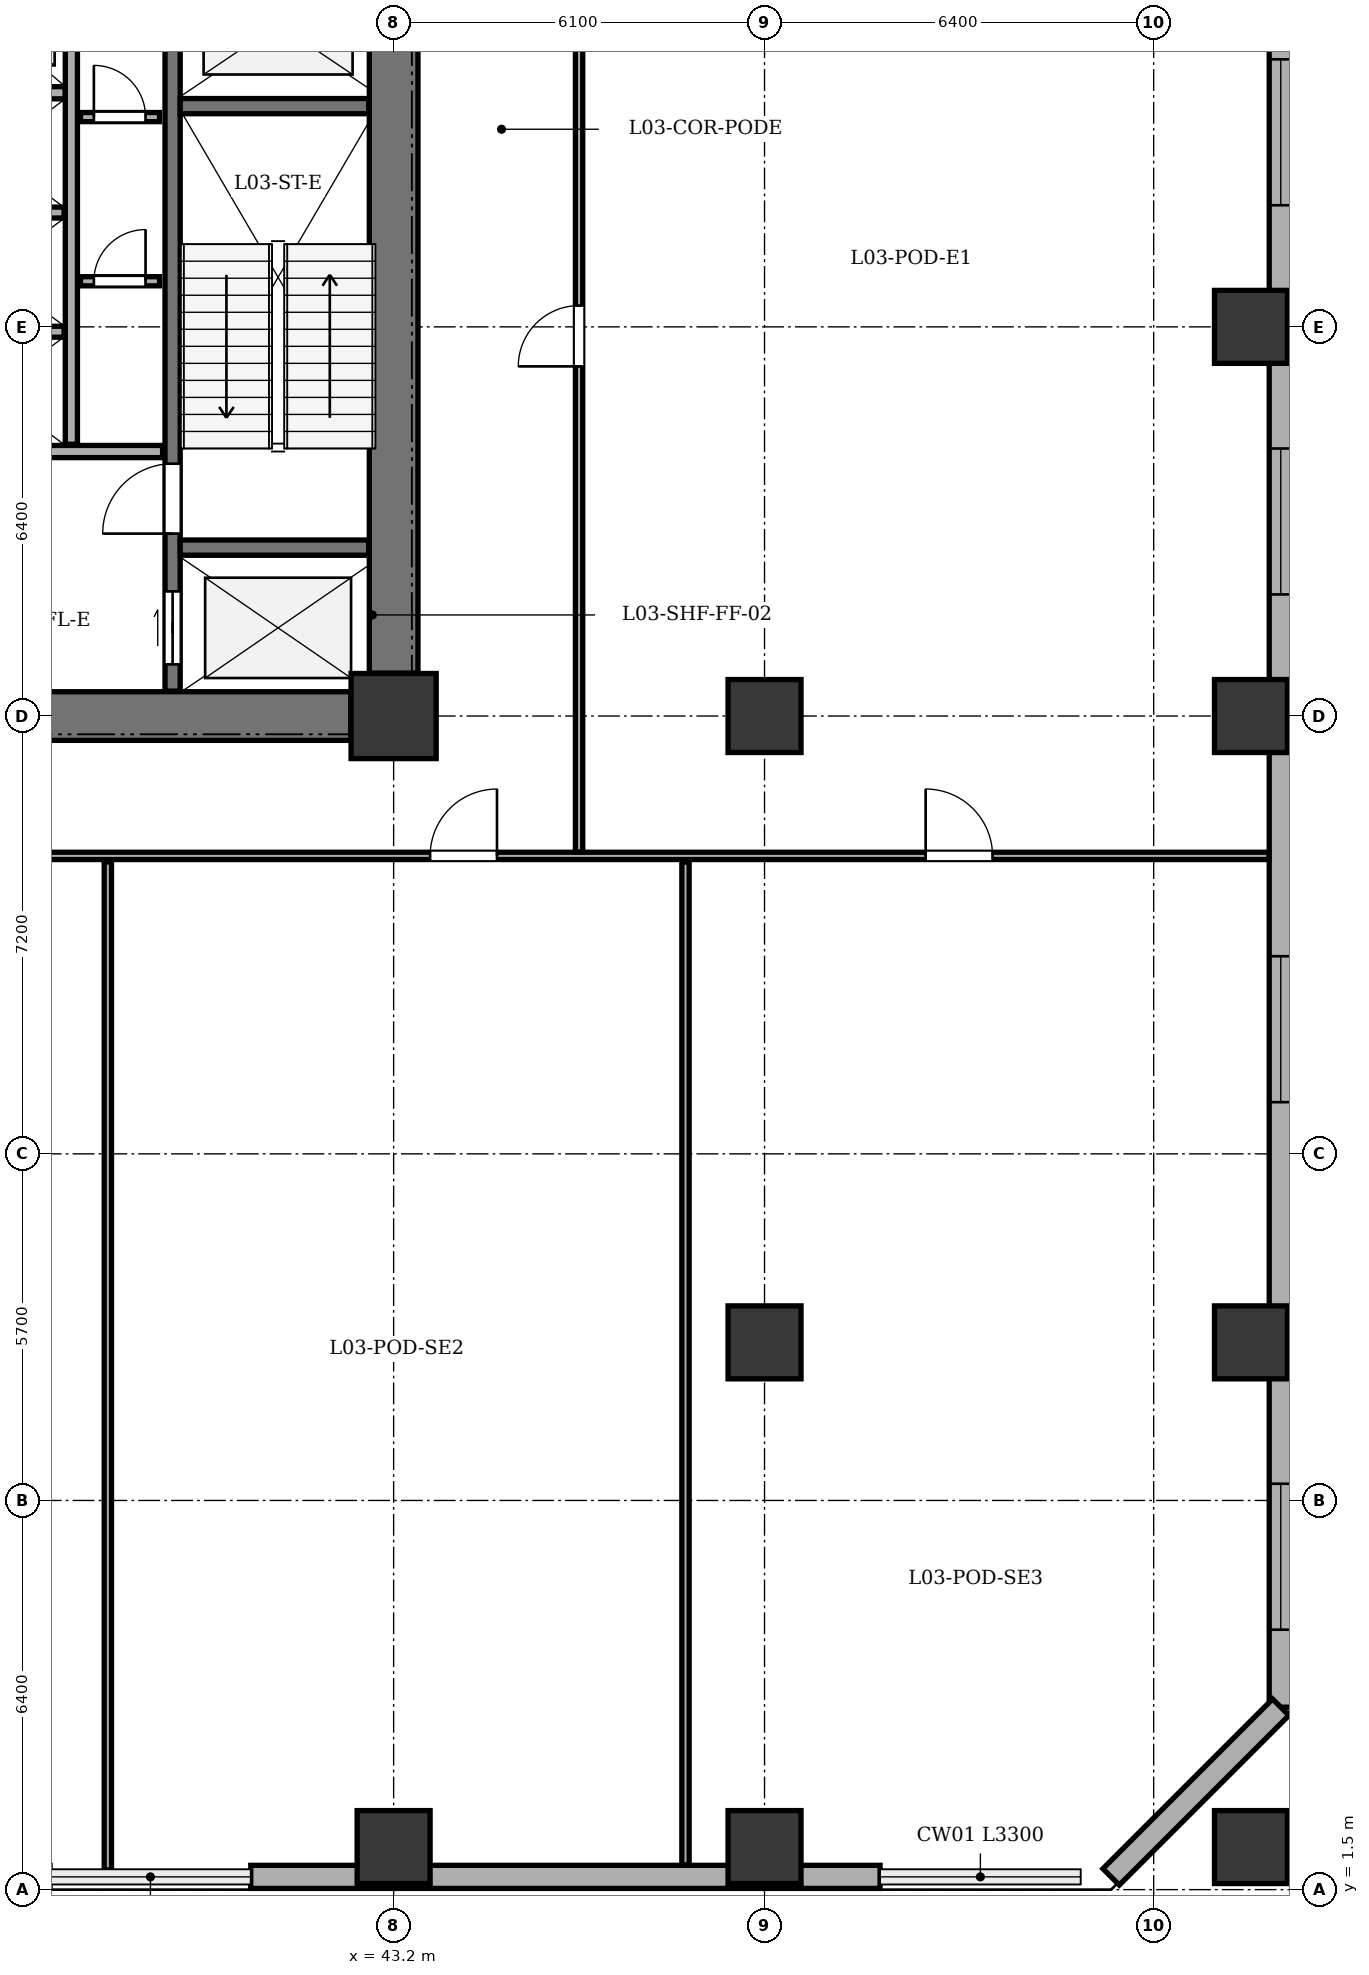
"""IFC4 building model, lengths in metres.
Left out: names, types, materials, properties, quantities, classifications, styles, units other than length and angle.
Written with IfcOpenShell. Run it as: python <this file> out.ifc"""

import sys

from ifc_helpers import new_model, si_unit, direction, frame, frame_2d, origin, origin_2d, place, context, subcontext, project, spatial, rectangle, extrude, element, fill, save


model = new_model("IFC4")
c1 = context("Model", 3, precision=1e-05, world=origin(), true_north=direction((0.0, 1.0)))
c2 = subcontext(c1, "Body", "Model", "MODEL_VIEW")
j1 = project(units=[si_unit("LENGTHUNIT", "METRE"), si_unit("PLANEANGLEUNIT", "RADIAN")], contexts=[c1])
p1 = place(None, origin())
s1 = spatial("IfcSite", under=j1, at=p1, CompositionType="ELEMENT")
p2 = place(p1, origin())
s2 = spatial("IfcBuilding", under=s1, at=p2, CompositionType="ELEMENT")
p3 = place(p2, frame((0.0, 0.0, 14.4)))
s3 = spatial("IfcBuildingStorey", under=s2, at=p3, CompositionType="ELEMENT", Elevation=14.4)
p4 = place(p3, frame((43.2, 20.8, 0.0), z_axis=(0.0, 0.0, 1.0), x_axis=(1.0, 0.0, 0.0)))
e1 = element("IfcColumn", 1, at=p4, inside=s3, PredefinedType="COLUMN", context=c2, shape_type="SweptSolid", body=[
    extrude(rectangle(XDim=1.4, YDim=1.4, at=origin_2d()), origin(), (0.0, 0.0, 1.0), 4.5),
])
for number, where, z_axis, x_axis in (
    (2, (43.2, 2.2, 0.0), (0.0, 0.0, 1.0), (1.0, 0.0, 0.0)),
    (3, (49.3, 2.2, 0.0), (0.0, 0.0, 1.0), (1.0, 0.0, 0.0)),
    (4, (57.3, 2.2, 0.0), (0.0, 0.0, 1.0), (1.0, 0.0, 0.0)),
    (5, (57.3, 10.5, 0.0), (0.0, 0.0, 1.0), (1.0, 0.0, 0.0)),
    (6, (57.3, 20.8, 0.0), (0.0, 0.0, 1.0), (1.0, 0.0, 0.0)),
    (7, (57.3, 27.2, 0.0), (0.0, 0.0, 1.0), (1.0, 0.0, 0.0)),
    (8, (49.3, 10.5, 0.0), (0.0, 0.0, 1.0), (1.0, 0.0, 0.0)),
    (9, (49.3, 20.8, 0.0), (0.0, 0.0, 1.0), (1.0, 0.0, 0.0)),
):
    element("IfcColumn", number, at=place(p3, frame(where, z_axis=z_axis, x_axis=x_axis)), inside=s3, PredefinedType="COLUMN", context=c2, shape_type="SweptSolid", body=[
        extrude(rectangle(XDim=1.2, YDim=1.2, at=origin_2d()), origin(), (0.0, 0.0, 1.0), 4.5),
    ])
p5 = place(p3, frame((51.2, 1.71, 0.0), z_axis=(0.0, 0.0, 1.0), x_axis=(-1.0, 0.0, 0.0)))
e10 = element("IfcWall", 10, at=p5, inside=s3, PredefinedType="STANDARD", context=c2, shape_type="SweptSolid", body=[
    extrude(rectangle(XDim=10.35, YDim=0.38, at=frame_2d((5.175, 0.0))), origin(), (0.0, 0.0, 1.0), 4.0),
])
p6 = place(p3, frame((57.79, 49.9, 0.0), z_axis=(0.0, 0.0, 1.0), x_axis=(0.0, -1.0, 0.0)))
e11 = element("IfcWall", 11, at=p6, inside=s3, PredefinedType="STANDARD", context=c2, shape_type="SweptSolid", body=[
    extrude(rectangle(XDim=45.4, YDim=0.38, at=frame_2d((22.7, 0.0))), origin(), (0.0, 0.0, 1.0), 4.0),
])
p7 = place(p6, frame((1.275, 0.0, 0.75)))
e12 = element("IfcOpeningElement", 12, at=p7, cuts=e11, PredefinedType="OPENING", context=c2, shape_type="SweptSolid", body=[
    extrude(rectangle(XDim=2.4, YDim=2.1, at=frame_2d((1.2, 1.05))), frame((0.0, 0.2, 0.0), z_axis=(0.0, -1.0, 0.0), x_axis=(1.0, 0.0, 0.0)), (0.0, 0.0, 1.0), 0.4),
])
p8 = place(p6, frame((9.95, 0.0, 0.75)))
e13 = element("IfcOpeningElement", 13, at=p8, cuts=e11, PredefinedType="OPENING", context=c2, shape_type="SweptSolid", body=[
    extrude(rectangle(XDim=2.4, YDim=2.1, at=frame_2d((1.2, 1.05))), frame((0.0, 0.2, 0.0), z_axis=(0.0, -1.0, 0.0), x_axis=(1.0, 0.0, 0.0)), (0.0, 0.0, 1.0), 0.4),
])
p9 = place(p6, frame((18.3, 0.0, 0.75)))
e14 = element("IfcOpeningElement", 14, at=p9, cuts=e11, PredefinedType="OPENING", context=c2, shape_type="SweptSolid", body=[
    extrude(rectangle(XDim=2.4, YDim=2.1, at=frame_2d((1.2, 1.05))), frame((0.0, 0.2, 0.0), z_axis=(0.0, -1.0, 0.0), x_axis=(1.0, 0.0, 0.0)), (0.0, 0.0, 1.0), 0.4),
])
p10 = place(p6, frame((24.7, 0.0, 0.75)))
e15 = element("IfcOpeningElement", 15, at=p10, cuts=e11, PredefinedType="OPENING", context=c2, shape_type="SweptSolid", body=[
    extrude(rectangle(XDim=2.4, YDim=2.1, at=frame_2d((1.2, 1.05))), frame((0.0, 0.2, 0.0), z_axis=(0.0, -1.0, 0.0), x_axis=(1.0, 0.0, 0.0)), (0.0, 0.0, 1.0), 0.4),
])
p11 = place(p6, frame((33.05, 0.0, 0.75)))
e16 = element("IfcOpeningElement", 16, at=p11, cuts=e11, PredefinedType="OPENING", context=c2, shape_type="SweptSolid", body=[
    extrude(rectangle(XDim=2.4, YDim=2.1, at=frame_2d((1.2, 1.05))), frame((0.0, 0.2, 0.0), z_axis=(0.0, -1.0, 0.0), x_axis=(1.0, 0.0, 0.0)), (0.0, 0.0, 1.0), 0.4),
])
p12 = place(p6, frame((41.725, 0.0, 0.75)))
e17 = element("IfcOpeningElement", 17, at=p12, cuts=e11, PredefinedType="OPENING", context=c2, shape_type="SweptSolid", body=[
    extrude(rectangle(XDim=2.4, YDim=2.1, at=frame_2d((1.2, 1.05))), frame((0.0, 0.2, 0.0), z_axis=(0.0, -1.0, 0.0), x_axis=(1.0, 0.0, 0.0)), (0.0, 0.0, 1.0), 0.4),
])
p13 = place(p3, frame((57.79, 4.5, 0.0), z_axis=(0.0, 0.0, 1.0), x_axis=(-0.707106781187, -0.707106781187, 0.0)))
e18 = element("IfcWall", 18, at=p13, inside=s3, PredefinedType="STANDARD", context=c2, shape_type="SweptSolid", body=[
    extrude(rectangle(XDim=3.946, YDim=0.38, at=frame_2d((1.973, 0.0))), origin(), (0.0, 0.0, 1.0), 4.0),
])
p14 = place(p3, frame((43.2, 21.505, 0.0), z_axis=(0.0, 0.0, 1.0), x_axis=(0.0, 1.0, 0.0)))
e19 = element("IfcWall", 19, at=p14, inside=s3, PredefinedType="SHEAR", context=c2, shape_type="SweptSolid", body=[
    extrude(rectangle(XDim=11.39, YDim=0.8, at=frame_2d((5.695, 0.0))), origin(), (0.0, 0.0, 1.0), 4.0),
])
p15 = place(p3, frame((35.905, 20.8, 0.0), z_axis=(0.0, 0.0, 1.0), x_axis=(1.0, 0.0, 0.0)))
e20 = element("IfcWall", 20, at=p15, inside=s3, PredefinedType="SHEAR", context=c2, shape_type="SweptSolid", body=[
    extrude(rectangle(XDim=6.59, YDim=0.8, at=frame_2d((3.295, 0.0))), origin(), (0.0, 0.0, 1.0), 4.0),
])
p16 = place(p3, frame((39.565, 21.21, 0.0), z_axis=(0.0, 0.0, 1.0), x_axis=(0.0, 1.0, 0.0)))
e21 = element("IfcWall", 21, at=p16, inside=s3, PredefinedType="SHEAR", context=c2, shape_type="SweptSolid", body=[
    extrude(rectangle(XDim=11.98, YDim=0.25, at=frame_2d((5.99, 0.0))), origin(), (0.0, 0.0, 1.0), 4.0),
])
p17 = place(p16, frame((0.44, 0.0, 0.0)))
e22 = element("IfcOpeningElement", 22, at=p17, cuts=e21, PredefinedType="OPENING", context=c2, shape_type="SweptSolid", body=[
    extrude(rectangle(XDim=1.2, YDim=2.15, at=frame_2d((0.6, 1.075))), frame((0.0, 0.135, 0.0), z_axis=(0.0, -1.0, 0.0), x_axis=(1.0, 0.0, 0.0)), (0.0, 0.0, 1.0), 0.27),
])
p18 = place(p16, frame((2.59, 0.0, 0.0)))
e23 = element("IfcOpeningElement", 23, at=p18, cuts=e21, PredefinedType="OPENING", context=c2, shape_type="SweptSolid", body=[
    extrude(rectangle(XDim=1.15, YDim=2.15, at=frame_2d((0.575, 1.075))), frame((0.0, 0.135, 0.0), z_axis=(0.0, -1.0, 0.0), x_axis=(1.0, 0.0, 0.0)), (0.0, 0.0, 1.0), 0.27),
])
for number, where, z_axis, x_axis in (
    (24, (39.69, 23.57, 0.0), (0.0, 0.0, 1.0), (1.0, 0.0, 0.0)),
    (25, (39.69, 30.83, 0.0), (0.0, 0.0, 1.0), (1.0, 0.0, 0.0)),
):
    element("IfcWall", number, at=place(p3, frame(where, z_axis=z_axis, x_axis=x_axis)), inside=s3, PredefinedType="SHEAR", context=c2, shape_type="SweptSolid", body=[
        extrude(rectangle(XDim=3.1, YDim=0.25, at=frame_2d((1.55, 0.0))), origin(), (0.0, 0.0, 1.0), 4.0),
    ])
p19 = place(p3, frame((35.61, 25.15, 0.0), z_axis=(0.0, 0.0, 1.0), x_axis=(1.0, 0.0, 0.0)))
e26 = element("IfcWall", 26, at=p19, inside=s3, PredefinedType="SOLIDWALL", context=c2, shape_type="SweptSolid", body=[
    extrude(rectangle(XDim=3.79, YDim=0.2, at=frame_2d((1.895, 0.0))), origin(), (0.0, 0.0, 1.0), 4.0),
])
p20 = place(p3, frame((35.55, 31.05, 0.0), z_axis=(0.0, 0.0, 1.0), x_axis=(1.0, 0.0, 0.0)))
e27 = element("IfcWall", 27, at=p20, inside=s3, PredefinedType="SOLIDWALL", context=c2, shape_type="SweptSolid", body=[
    extrude(rectangle(XDim=2.25, YDim=0.2, at=frame_2d((1.125, 0.0))), origin(), (0.0, 0.0, 1.0), 4.0),
])
p21 = place(p3, frame((37.9, 25.27, 0.0), z_axis=(0.0, 0.0, 1.0), x_axis=(0.0, 1.0, 0.0)))
e28 = element("IfcWall", 28, at=p21, inside=s3, PredefinedType="SOLIDWALL", context=c2, shape_type="SweptSolid", body=[
    extrude(rectangle(XDim=7.92, YDim=0.2, at=frame_2d((3.96, 0.0))), origin(), (0.0, 0.0, 1.0), 4.0),
])
for number, where, z_axis, x_axis in (
    (29, (35.61, 27.12, 0.0), (0.0, 0.0, 1.0), (1.0, 0.0, 0.0)),
    (30, (35.61, 29.08, 0.0), (0.0, 0.0, 1.0), (1.0, 0.0, 0.0)),
):
    element("IfcWall", number, at=place(p3, frame(where, z_axis=z_axis, x_axis=x_axis)), inside=s3, PredefinedType="PARTITIONING", context=c2, shape_type="SweptSolid", body=[
        extrude(rectangle(XDim=2.17, YDim=0.18, at=frame_2d((1.085, 0.0))), origin(), (0.0, 0.0, 1.0), 4.0),
    ])
p22 = place(p3, frame((38.05, 27.95, 0.0), z_axis=(0.0, 0.0, 1.0), x_axis=(1.0, 0.0, 0.0)))
e31 = element("IfcWall", 31, at=p22, inside=s3, PredefinedType="PARTITIONING", context=c2, shape_type="SweptSolid", body=[
    extrude(rectangle(XDim=1.3, YDim=0.15, at=frame_2d((0.65, 0.0))), origin(), (0.0, 0.0, 1.0), 4.0),
])
p23 = place(p22, frame((0.22, 0.0, 0.0)))
e32 = element("IfcOpeningElement", 32, at=p23, cuts=e31, PredefinedType="OPENING", context=c2, shape_type="SweptSolid", body=[
    extrude(rectangle(XDim=0.85, YDim=2.02, at=frame_2d((0.425, 1.01))), frame((0.0, 0.085, 0.0), z_axis=(0.0, -1.0, 0.0), x_axis=(1.0, 0.0, 0.0)), (0.0, 0.0, 1.0), 0.17),
])
p24 = place(p3, frame((38.05, 30.65, 0.0), z_axis=(0.0, 0.0, 1.0), x_axis=(1.0, 0.0, 0.0)))
e33 = element("IfcWall", 33, at=p24, inside=s3, PredefinedType="PARTITIONING", context=c2, shape_type="SweptSolid", body=[
    extrude(rectangle(XDim=1.3, YDim=0.15, at=frame_2d((0.65, 0.0))), origin(), (0.0, 0.0, 1.0), 4.0),
])
p25 = place(p24, frame((0.22, 0.0, 0.0)))
e34 = element("IfcOpeningElement", 34, at=p25, cuts=e33, PredefinedType="OPENING", context=c2, shape_type="SweptSolid", body=[
    extrude(rectangle(XDim=0.85, YDim=2.02, at=frame_2d((0.425, 1.01))), frame((0.0, 0.085, 0.0), z_axis=(0.0, -1.0, 0.0), x_axis=(1.0, 0.0, 0.0)), (0.0, 0.0, 1.0), 0.17),
])
p26 = place(p3, frame((26.015, 18.5, 0.0), z_axis=(0.0, 0.0, 1.0), x_axis=(1.0, 0.0, 0.0)))
e35 = element("IfcWall", 35, at=p26, inside=s3, PredefinedType="PARTITIONING", context=c2, shape_type="SweptSolid", body=[
    extrude(rectangle(XDim=31.58, YDim=0.12, at=frame_2d((15.79, 0.0))), origin(), (0.0, 0.0, 1.0), 3.435),
])
p27 = place(p26, frame((5.61, 0.0, 0.0)))
e36 = element("IfcOpeningElement", 36, at=p27, cuts=e35, PredefinedType="OPENING", context=c2, shape_type="SweptSolid", body=[
    extrude(rectangle(XDim=1.1, YDim=2.15, at=frame_2d((0.55, 1.075))), frame((0.0, 0.07, 0.0), z_axis=(0.0, -1.0, 0.0), x_axis=(1.0, 0.0, 0.0)), (0.0, 0.0, 1.0), 0.14),
])
p28 = place(p26, frame((17.785, 0.0, 0.0)))
e37 = element("IfcOpeningElement", 37, at=p28, cuts=e35, PredefinedType="OPENING", context=c2, shape_type="SweptSolid", body=[
    extrude(rectangle(XDim=1.1, YDim=2.15, at=frame_2d((0.55, 1.075))), frame((0.0, 0.07, 0.0), z_axis=(0.0, -1.0, 0.0), x_axis=(1.0, 0.0, 0.0)), (0.0, 0.0, 1.0), 0.14),
])
p29 = place(p26, frame((25.935, 0.0, 0.0)))
e38 = element("IfcOpeningElement", 38, at=p29, cuts=e35, PredefinedType="OPENING", context=c2, shape_type="SweptSolid", body=[
    extrude(rectangle(XDim=1.1, YDim=2.15, at=frame_2d((0.55, 1.075))), frame((0.0, 0.07, 0.0), z_axis=(0.0, -1.0, 0.0), x_axis=(1.0, 0.0, 0.0)), (0.0, 0.0, 1.0), 0.14),
])
p30 = place(p3, frame((38.5, 1.825, 0.0), z_axis=(0.0, 0.0, 1.0), x_axis=(0.0, 1.0, 0.0)))
e39 = element("IfcWall", 39, at=p30, inside=s3, PredefinedType="PARTITIONING", context=c2, shape_type="SweptSolid", body=[
    extrude(rectangle(XDim=16.575, YDim=0.12, at=frame_2d((8.288, 0.0))), origin(), (0.0, 0.0, 1.0), 4.0),
])
p31 = place(p3, frame((48.0, 1.905, 0.0), z_axis=(0.0, 0.0, 1.0), x_axis=(0.0, 1.0, 0.0)))
e40 = element("IfcWall", 40, at=p31, inside=s3, PredefinedType="PARTITIONING", context=c2, shape_type="SweptSolid", body=[
    extrude(rectangle(XDim=16.495, YDim=0.12, at=frame_2d((8.248, 0.0))), origin(), (0.0, 0.0, 1.0), 4.0),
])
p32 = place(p3, frame((46.25, 18.565, 0.0), z_axis=(0.0, 0.0, 1.0), x_axis=(0.0, 1.0, 0.0)))
e41 = element("IfcWall", 41, at=p32, inside=s3, PredefinedType="PARTITIONING", context=c2, shape_type="SweptSolid", body=[
    extrude(rectangle(XDim=19.72, YDim=0.12, at=frame_2d((9.86, 0.0))), origin(), (0.0, 0.0, 1.0), 4.0),
])
p33 = place(p32, frame((7.985, 0.0, 0.0)))
e42 = element("IfcOpeningElement", 42, at=p33, cuts=e41, PredefinedType="OPENING", context=c2, shape_type="SweptSolid", body=[
    extrude(rectangle(XDim=1.0, YDim=2.1, at=frame_2d((0.5, 1.05))), frame((0.0, 0.07, 0.0), z_axis=(0.0, -1.0, 0.0), x_axis=(1.0, 0.0, 0.0)), (0.0, 0.0, 1.0), 0.14),
])
p34 = place(p9, origin())
e43 = element("IfcWindow", 43, at=p34, inside=s3, PartitioningType="SINGLE_PANEL", PredefinedType="WINDOW", context=c2, shape_type="SweptSolid", body=[
    extrude(rectangle(XDim=2.4, YDim=2.1, at=frame_2d((1.2, 1.05))), frame((0.0, 0.03, 0.0), z_axis=(0.0, -1.0, 0.0), x_axis=(1.0, 0.0, 0.0)), (0.0, 0.0, 1.0), 0.06),
])
fill(e14, e43)
p35 = place(p10, origin())
e44 = element("IfcWindow", 44, at=p35, inside=s3, PartitioningType="SINGLE_PANEL", PredefinedType="WINDOW", context=c2, shape_type="SweptSolid", body=[
    extrude(rectangle(XDim=2.4, YDim=2.1, at=frame_2d((1.2, 1.05))), frame((0.0, 0.03, 0.0), z_axis=(0.0, -1.0, 0.0), x_axis=(1.0, 0.0, 0.0)), (0.0, 0.0, 1.0), 0.06),
])
fill(e15, e44)
p36 = place(p11, origin())
e45 = element("IfcWindow", 45, at=p36, inside=s3, PartitioningType="SINGLE_PANEL", PredefinedType="WINDOW", context=c2, shape_type="SweptSolid", body=[
    extrude(rectangle(XDim=2.4, YDim=2.1, at=frame_2d((1.2, 1.05))), frame((0.0, 0.03, 0.0), z_axis=(0.0, -1.0, 0.0), x_axis=(1.0, 0.0, 0.0)), (0.0, 0.0, 1.0), 0.06),
])
fill(e16, e45)
p37 = place(p12, origin())
e46 = element("IfcWindow", 46, at=p37, inside=s3, PartitioningType="SINGLE_PANEL", PredefinedType="WINDOW", context=c2, shape_type="SweptSolid", body=[
    extrude(rectangle(XDim=2.4, YDim=2.1, at=frame_2d((1.2, 1.05))), frame((0.0, 0.03, 0.0), z_axis=(0.0, -1.0, 0.0), x_axis=(1.0, 0.0, 0.0)), (0.0, 0.0, 1.0), 0.06),
])
fill(e17, e46)
p38 = place(p17, origin())
e47 = element("IfcDoor", 47, at=p38, inside=s3, OperationType="DOUBLE_DOOR_SLIDING", PredefinedType="DOOR", context=c2, shape_type="SweptSolid", body=[
    extrude(rectangle(XDim=1.2, YDim=2.15, at=frame_2d((0.6, 1.075))), frame((0.0, 0.025, 0.0), z_axis=(0.0, -1.0, 0.0), x_axis=(1.0, 0.0, 0.0)), (0.0, 0.0, 1.0), 0.05),
])
fill(e22, e47)
p39 = place(p18, origin())
e48 = element("IfcDoor", 48, at=p39, inside=s3, OperationType="SINGLE_SWING_LEFT", PredefinedType="DOOR", context=c2, shape_type="SweptSolid", body=[
    extrude(rectangle(XDim=1.15, YDim=2.15, at=frame_2d((0.575, 1.075))), frame((0.0, 0.025, 0.0), z_axis=(0.0, -1.0, 0.0), x_axis=(1.0, 0.0, 0.0)), (0.0, 0.0, 1.0), 0.05),
])
fill(e23, e48)
p40 = place(p23, origin())
e49 = element("IfcDoor", 49, at=p40, inside=s3, OperationType="SINGLE_SWING_RIGHT", PredefinedType="DOOR", context=c2, shape_type="SweptSolid", body=[
    extrude(rectangle(XDim=0.85, YDim=2.02, at=frame_2d((0.425, 1.01))), frame((0.0, 0.025, 0.0), z_axis=(0.0, -1.0, 0.0), x_axis=(1.0, 0.0, 0.0)), (0.0, 0.0, 1.0), 0.05),
])
fill(e32, e49)
p41 = place(p25, origin())
e50 = element("IfcDoor", 50, at=p41, inside=s3, OperationType="SINGLE_SWING_LEFT", PredefinedType="DOOR", context=c2, shape_type="SweptSolid", body=[
    extrude(rectangle(XDim=0.85, YDim=2.02, at=frame_2d((0.425, 1.01))), frame((0.0, 0.025, 0.0), z_axis=(0.0, -1.0, 0.0), x_axis=(1.0, 0.0, 0.0)), (0.0, 0.0, 1.0), 0.05),
])
fill(e34, e50)
p42 = place(p28, origin())
e51 = element("IfcDoor", 51, at=p42, inside=s3, OperationType="SINGLE_SWING_RIGHT", PredefinedType="DOOR", context=c2, shape_type="SweptSolid", body=[
    extrude(rectangle(XDim=1.1, YDim=2.15, at=frame_2d((0.55, 1.075))), frame((0.0, 0.025, 0.0), z_axis=(0.0, -1.0, 0.0), x_axis=(1.0, 0.0, 0.0)), (0.0, 0.0, 1.0), 0.05),
])
fill(e37, e51)
p43 = place(p29, origin())
e52 = element("IfcDoor", 52, at=p43, inside=s3, OperationType="SINGLE_SWING_LEFT", PredefinedType="DOOR", context=c2, shape_type="SweptSolid", body=[
    extrude(rectangle(XDim=1.1, YDim=2.15, at=frame_2d((0.55, 1.075))), frame((0.0, 0.025, 0.0), z_axis=(0.0, -1.0, 0.0), x_axis=(1.0, 0.0, 0.0)), (0.0, 0.0, 1.0), 0.05),
])
fill(e38, e52)
p44 = place(p33, origin())
e53 = element("IfcDoor", 53, at=p44, inside=s3, OperationType="SINGLE_SWING_LEFT", PredefinedType="DOOR", context=c2, shape_type="SweptSolid", body=[
    extrude(rectangle(XDim=1.0, YDim=2.1, at=frame_2d((0.5, 1.05))), frame((0.0, 0.025, 0.0), z_axis=(0.0, -1.0, 0.0), x_axis=(1.0, 0.0, 0.0)), (0.0, 0.0, 1.0), 0.05),
])
fill(e42, e53)
save(model, sys.argv[1])
